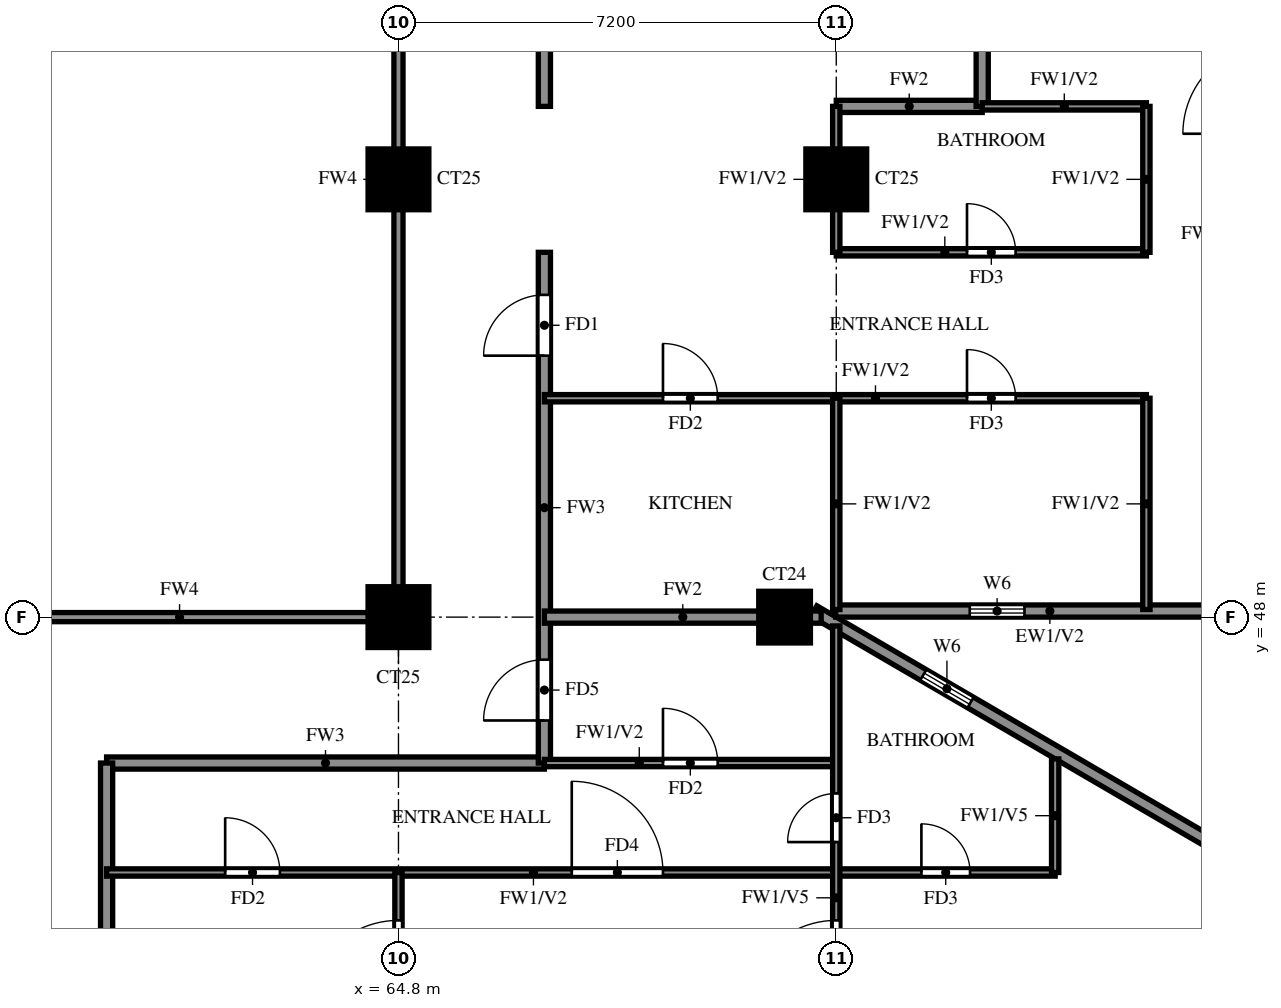
"""IFC4 building model, lengths in metres.
Left out: names, types, materials, properties, quantities, classifications, styles, units other than length and angle.
Written with IfcOpenShell. Run it as: python <this file> out.ifc"""

import sys

from ifc_helpers import new_model, si_unit, direction, frame, frame_2d, origin, origin_2d, place, context, subcontext, project, spatial, rectangle, extrude, source, transform, mapped, element, fill, save


model = new_model("IFC4")
c1 = context("Model", 3, precision=1e-05, world=origin(), true_north=direction((0.0, 1.0)))
c2 = subcontext(c1, "Body", "Model", "MODEL_VIEW")
j1 = project(units=[si_unit("LENGTHUNIT", "METRE"), si_unit("PLANEANGLEUNIT", "RADIAN")], contexts=[c1])
p1 = place(None, origin())
s1 = spatial("IfcSite", under=j1, at=p1, CompositionType="ELEMENT")
p2 = place(p1, origin())
s2 = spatial("IfcBuilding", under=s1, at=p2, CompositionType="ELEMENT")
p3 = place(p2, frame((0.0, 0.0, 146.5)))
s3 = spatial("IfcBuildingStorey", under=s2, at=p3, CompositionType="ELEMENT", Elevation=146.5)
m1 = source(origin(), c2, "Body", "SweptSolid", [
    extrude(rectangle(XDim=1.0, YDim=1.0, at=origin_2d()), origin(), (0.0, 0.0, 1.0), 3.2),
])
p4 = place(p3, frame((64.8, 48.0, 0.0), z_axis=(0.0, 0.0, 1.0), x_axis=(1.0, 0.0, 0.0)))
e1 = element("IfcColumn", 1, at=p4, inside=s3, PredefinedType="COLUMN", context=c2, shape_type="MappedRepresentation", body=[
    mapped(m1, transform((0.0, 0.0, 0.0))),
])
m2 = source(origin(), c2, "Body", "SweptSolid", [
    extrude(rectangle(XDim=0.85, YDim=0.85, at=origin_2d()), origin(), (0.0, 0.0, 1.0), 3.2),
])
p5 = place(p3, frame((71.15, 48.0, 0.0), z_axis=(0.0, 0.0, 1.0), x_axis=(1.0, 0.0, 0.0)))
e2 = element("IfcColumn", 2, at=p5, inside=s3, PredefinedType="COLUMN", context=c2, shape_type="MappedRepresentation", body=[
    mapped(m2, transform((0.0, 0.0, 0.0))),
])
for number, where, z_axis, x_axis in (
    (3, (64.8, 55.2, 0.0), (0.0, 0.0, 1.0), (1.0, 0.0, 0.0)),
    (4, (72.0, 55.2, 0.0), (0.0, 0.0, 1.0), (1.0, 0.0, 0.0)),
):
    element("IfcColumn", number, at=place(p3, frame(where, z_axis=z_axis, x_axis=x_axis)), inside=s3, PredefinedType="COLUMN", context=c2, shape_type="MappedRepresentation", body=[
        mapped(m1, transform((0.0, 0.0, 0.0))),
    ])
p6 = place(p3, frame((85.719, 39.881, 0.0), z_axis=(0.0, 0.0, 1.0), x_axis=(-0.86377618652, 0.503875678716, 0.0)))
e5 = element("IfcWall", 5, at=p6, inside=s3, PredefinedType="SOLIDWALL", context=c2, shape_type="SweptSolid", body=[
    extrude(rectangle(XDim=16.311, YDim=0.2, at=frame_2d((8.156, 0.0))), origin(), (0.0, 0.0, 1.0), 3.2),
])
p7 = place(p6, frame((13.326, 0.0, 1.5)))
e6 = element("IfcOpeningElement", 6, at=p7, cuts=e5, PredefinedType="OPENING", context=c2, shape_type="SweptSolid", body=[
    extrude(rectangle(XDim=0.9, YDim=0.9, at=frame_2d((0.45, 0.45))), frame((0.0, 0.11, 0.0), z_axis=(0.0, -1.0, 0.0), x_axis=(1.0, 0.0, 0.0)), (0.0, 0.0, 1.0), 0.22),
])
p8 = place(p3, frame((71.99, 48.1, 0.0), z_axis=(0.0, 0.0, 1.0), x_axis=(1.0, 0.0, 0.0)))
e7 = element("IfcWall", 7, at=p8, inside=s3, PredefinedType="SOLIDWALL", context=c2, shape_type="SweptSolid", body=[
    extrude(rectangle(XDim=6.71, YDim=0.2, at=frame_2d((3.355, 0.0))), origin(), (0.0, 0.0, 1.0), 3.2),
])
p9 = place(p8, frame((2.205, 0.0, 1.5)))
e8 = element("IfcOpeningElement", 8, at=p9, cuts=e7, PredefinedType="OPENING", context=c2, shape_type="SweptSolid", body=[
    extrude(rectangle(XDim=0.9, YDim=0.9, at=frame_2d((0.45, 0.45))), frame((0.0, 0.11, 0.0), z_axis=(0.0, -1.0, 0.0), x_axis=(1.0, 0.0, 0.0)), (0.0, 0.0, 1.0), 0.22),
])
p10 = place(p3, frame((60.0, 45.6, 0.0), z_axis=(0.0, 0.0, 1.0), x_axis=(1.0, 0.0, 0.0)))
e9 = element("IfcWall", 9, at=p10, inside=s3, PredefinedType="SOLIDWALL", context=c2, shape_type="SweptSolid", body=[
    extrude(rectangle(XDim=7.2, YDim=0.2, at=frame_2d((3.6, 0.0))), origin(), (0.0, 0.0, 1.0), 3.2),
])
p11 = place(p3, frame((60.0, 39.725, 0.0), z_axis=(0.0, 0.0, 1.0), x_axis=(0.0, 1.0, 0.0)))
e10 = element("IfcWall", 10, at=p11, inside=s3, PredefinedType="SOLIDWALL", context=c2, shape_type="SweptSolid", body=[
    extrude(rectangle(XDim=5.875, YDim=0.2, at=frame_2d((2.938, 0.0))), origin(), (0.0, 0.0, 1.0), 3.2),
])
p12 = place(p3, frame((67.2, 45.6, 0.0), z_axis=(0.0, 0.0, 1.0), x_axis=(0.0, 1.0, 0.0)))
e11 = element("IfcWall", 11, at=p12, inside=s3, PredefinedType="SOLIDWALL", context=c2, shape_type="SweptSolid", body=[
    extrude(rectangle(XDim=8.4, YDim=0.2, at=frame_2d((4.2, 0.0))), origin(), (0.0, 0.0, 1.0), 3.2),
])
p13 = place(p12, frame((6.7, 0.0, 0.0)))
e12 = element("IfcOpeningElement", 12, at=p13, cuts=e11, PredefinedType="OPENING", context=c2, shape_type="SweptSolid", body=[
    extrude(rectangle(XDim=1.0, YDim=2.1, at=frame_2d((0.5, 1.05))), frame((0.0, 0.11, 0.0), z_axis=(0.0, -1.0, 0.0), x_axis=(1.0, 0.0, 0.0)), (0.0, 0.0, 1.0), 0.22),
])
p14 = place(p12, frame((0.7, 0.0, 0.0)))
e13 = element("IfcOpeningElement", 13, at=p14, cuts=e11, PredefinedType="OPENING", context=c2, shape_type="SweptSolid", body=[
    extrude(rectangle(XDim=1.0, YDim=2.1, at=frame_2d((0.5, 1.05))), frame((0.0, 0.11, 0.0), z_axis=(0.0, -1.0, 0.0), x_axis=(1.0, 0.0, 0.0)), (0.0, 0.0, 1.0), 0.22),
])
p15 = place(p3, frame((67.2, 56.4, 0.0), z_axis=(0.0, 0.0, 1.0), x_axis=(0.0, 1.0, 0.0)))
e14 = element("IfcWall", 14, at=p15, inside=s3, PredefinedType="SOLIDWALL", context=c2, shape_type="SweptSolid", body=[
    extrude(rectangle(XDim=6.0, YDim=0.2, at=frame_2d((3.0, 0.0))), origin(), (0.0, 0.0, 1.0), 3.2),
])
p16 = place(p15, frame((3.7, 0.0, 0.0)))
e15 = element("IfcOpeningElement", 15, at=p16, cuts=e14, PredefinedType="OPENING", context=c2, shape_type="SweptSolid", body=[
    extrude(rectangle(XDim=1.0, YDim=2.1, at=frame_2d((0.5, 1.05))), frame((0.0, 0.11, 0.0), z_axis=(0.0, -1.0, 0.0), x_axis=(1.0, 0.0, 0.0)), (0.0, 0.0, 1.0), 0.22),
])
p17 = place(p3, frame((67.2, 48.0, 0.0), z_axis=(0.0, 0.0, 1.0), x_axis=(1.0, 0.0, 0.0)))
e16 = element("IfcWall", 16, at=p17, inside=s3, PredefinedType="SOLIDWALL", context=c2, shape_type="SweptSolid", body=[
    extrude(rectangle(XDim=4.552, YDim=0.2, at=frame_2d((2.276, 0.0))), origin(), (0.0, 0.0, 1.0), 3.2),
])
p18 = place(p3, frame((72.0, 56.4, 0.0), z_axis=(0.0, 0.0, 1.0), x_axis=(1.0, 0.0, 0.0)))
e17 = element("IfcWall", 17, at=p18, inside=s3, PredefinedType="SOLIDWALL", context=c2, shape_type="SweptSolid", body=[
    extrude(rectangle(XDim=2.4, YDim=0.2, at=frame_2d((1.2, 0.0))), origin(), (0.0, 0.0, 1.0), 3.2),
])
p19 = place(p3, frame((74.4, 56.4, 0.0), z_axis=(0.0, 0.0, 1.0), x_axis=(0.0, 1.0, 0.0)))
e18 = element("IfcWall", 18, at=p19, inside=s3, PredefinedType="SOLIDWALL", context=c2, shape_type="SweptSolid", body=[
    extrude(rectangle(XDim=2.4, YDim=0.2, at=frame_2d((1.2, 0.0))), origin(), (0.0, 0.0, 1.0), 3.2),
])
p20 = place(p3, frame((60.0, 43.8, 0.0), z_axis=(0.0, 0.0, 1.0), x_axis=(1.0, 0.0, 0.0)))
e19 = element("IfcWall", 19, at=p20, inside=s3, PredefinedType="PARTITIONING", context=c2, shape_type="SweptSolid", body=[
    extrude(rectangle(XDim=15.6, YDim=0.12, at=frame_2d((7.8, 0.0))), origin(), (0.0, 0.0, 1.0), 3.2),
])
p21 = place(p20, frame((7.65, 0.0, 0.0)))
e20 = element("IfcOpeningElement", 20, at=p21, cuts=e19, PredefinedType="OPENING", context=c2, shape_type="SweptSolid", body=[
    extrude(rectangle(XDim=1.5, YDim=2.1, at=frame_2d((0.75, 1.05))), frame((0.0, 0.07, 0.0), z_axis=(0.0, -1.0, 0.0), x_axis=(1.0, 0.0, 0.0)), (0.0, 0.0, 1.0), 0.14),
])
p22 = place(p20, frame((1.95, 0.0, 0.0)))
e21 = element("IfcOpeningElement", 21, at=p22, cuts=e19, PredefinedType="OPENING", context=c2, shape_type="SweptSolid", body=[
    extrude(rectangle(XDim=0.9, YDim=2.1, at=frame_2d((0.45, 1.05))), frame((0.0, 0.07, 0.0), z_axis=(0.0, -1.0, 0.0), x_axis=(1.0, 0.0, 0.0)), (0.0, 0.0, 1.0), 0.14),
])
p23 = place(p20, frame((13.4, 0.0, 0.0)))
e22 = element("IfcOpeningElement", 22, at=p23, cuts=e19, PredefinedType="OPENING", context=c2, shape_type="SweptSolid", body=[
    extrude(rectangle(XDim=0.8, YDim=2.1, at=frame_2d((0.4, 1.05))), frame((0.0, 0.07, 0.0), z_axis=(0.0, -1.0, 0.0), x_axis=(1.0, 0.0, 0.0)), (0.0, 0.0, 1.0), 0.14),
])
p24 = place(p3, frame((67.2, 45.6, 0.0), z_axis=(0.0, 0.0, 1.0), x_axis=(1.0, 0.0, 0.0)))
e23 = element("IfcWall", 23, at=p24, inside=s3, PredefinedType="PARTITIONING", context=c2, shape_type="SweptSolid", body=[
    extrude(rectangle(XDim=4.8, YDim=0.12, at=frame_2d((2.4, 0.0))), origin(), (0.0, 0.0, 1.0), 3.2),
])
p25 = place(p24, frame((1.95, 0.0, 0.0)))
e24 = element("IfcOpeningElement", 24, at=p25, cuts=e23, PredefinedType="OPENING", context=c2, shape_type="SweptSolid", body=[
    extrude(rectangle(XDim=0.9, YDim=2.1, at=frame_2d((0.45, 1.05))), frame((0.0, 0.07, 0.0), z_axis=(0.0, -1.0, 0.0), x_axis=(1.0, 0.0, 0.0)), (0.0, 0.0, 1.0), 0.14),
])
p26 = place(p3, frame((67.2, 51.6, 0.0), z_axis=(0.0, 0.0, 1.0), x_axis=(1.0, 0.0, 0.0)))
e25 = element("IfcWall", 25, at=p26, inside=s3, PredefinedType="PARTITIONING", context=c2, shape_type="SweptSolid", body=[
    extrude(rectangle(XDim=9.9, YDim=0.12, at=frame_2d((4.95, 0.0))), origin(), (0.0, 0.0, 1.0), 3.2),
])
p27 = place(p26, frame((6.95, 0.0, 0.0)))
e26 = element("IfcOpeningElement", 26, at=p27, cuts=e25, PredefinedType="OPENING", context=c2, shape_type="SweptSolid", body=[
    extrude(rectangle(XDim=0.8, YDim=2.1, at=frame_2d((0.4, 1.05))), frame((0.0, 0.07, 0.0), z_axis=(0.0, -1.0, 0.0), x_axis=(1.0, 0.0, 0.0)), (0.0, 0.0, 1.0), 0.14),
])
p28 = place(p26, frame((1.95, 0.0, 0.0)))
e27 = element("IfcOpeningElement", 27, at=p28, cuts=e25, PredefinedType="OPENING", context=c2, shape_type="SweptSolid", body=[
    extrude(rectangle(XDim=0.9, YDim=2.1, at=frame_2d((0.45, 1.05))), frame((0.0, 0.07, 0.0), z_axis=(0.0, -1.0, 0.0), x_axis=(1.0, 0.0, 0.0)), (0.0, 0.0, 1.0), 0.14),
])
p29 = place(p3, frame((72.0, 54.0, 0.0), z_axis=(0.0, 0.0, 1.0), x_axis=(1.0, 0.0, 0.0)))
e28 = element("IfcWall", 28, at=p29, inside=s3, PredefinedType="PARTITIONING", context=c2, shape_type="SweptSolid", body=[
    extrude(rectangle(XDim=5.1, YDim=0.12, at=frame_2d((2.55, 0.0))), origin(), (0.0, 0.0, 1.0), 3.2),
])
p30 = place(p29, frame((2.15, 0.0, 0.0)))
e29 = element("IfcOpeningElement", 29, at=p30, cuts=e28, PredefinedType="OPENING", context=c2, shape_type="SweptSolid", body=[
    extrude(rectangle(XDim=0.8, YDim=2.1, at=frame_2d((0.4, 1.05))), frame((0.0, 0.07, 0.0), z_axis=(0.0, -1.0, 0.0), x_axis=(1.0, 0.0, 0.0)), (0.0, 0.0, 1.0), 0.14),
])
p31 = place(p3, frame((74.4, 56.4, 0.0), z_axis=(0.0, 0.0, 1.0), x_axis=(1.0, 0.0, 0.0)))
e30 = element("IfcWall", 30, at=p31, inside=s3, PredefinedType="PARTITIONING", context=c2, shape_type="SweptSolid", body=[
    extrude(rectangle(XDim=2.7, YDim=0.12, at=frame_2d((1.35, 0.0))), origin(), (0.0, 0.0, 1.0), 3.2),
])
p32 = place(p3, frame((64.8, 39.725, 0.0), z_axis=(0.0, 0.0, 1.0), x_axis=(0.0, 1.0, 0.0)))
e31 = element("IfcWall", 31, at=p32, inside=s3, PredefinedType="PARTITIONING", context=c2, shape_type="SweptSolid", body=[
    extrude(rectangle(XDim=4.075, YDim=0.12, at=frame_2d((2.038, 0.0))), origin(), (0.0, 0.0, 1.0), 3.2),
])
p33 = place(p32, frame((1.788, 0.0, 0.0)))
e32 = element("IfcOpeningElement", 32, at=p33, cuts=e31, PredefinedType="OPENING", context=c2, shape_type="SweptSolid", body=[
    extrude(rectangle(XDim=1.5, YDim=2.1, at=frame_2d((0.75, 1.05))), frame((0.0, 0.07, 0.0), z_axis=(0.0, -1.0, 0.0), x_axis=(1.0, 0.0, 0.0)), (0.0, 0.0, 1.0), 0.14),
])
p34 = place(p3, frame((72.0, 39.725, 0.0), z_axis=(0.0, 0.0, 1.0), x_axis=(0.0, 1.0, 0.0)))
e33 = element("IfcWall", 33, at=p34, inside=s3, PredefinedType="PARTITIONING", context=c2, shape_type="SweptSolid", body=[
    extrude(rectangle(XDim=8.13, YDim=0.12, at=frame_2d((4.065, 0.0))), origin(), (0.0, 0.0, 1.0), 2.3),
])
p35 = place(p34, frame((1.788, 0.0, 0.0)))
e34 = element("IfcOpeningElement", 34, at=p35, cuts=e33, PredefinedType="OPENING", context=c2, shape_type="SweptSolid", body=[
    extrude(rectangle(XDim=1.5, YDim=2.1, at=frame_2d((0.75, 1.05))), frame((0.0, 0.07, 0.0), z_axis=(0.0, -1.0, 0.0), x_axis=(1.0, 0.0, 0.0)), (0.0, 0.0, 1.0), 0.14),
])
p36 = place(p34, frame((4.575, 0.0, 0.0)))
e35 = element("IfcOpeningElement", 35, at=p36, cuts=e33, PredefinedType="OPENING", context=c2, shape_type="SweptSolid", body=[
    extrude(rectangle(XDim=0.8, YDim=2.1, at=frame_2d((0.4, 1.05))), frame((0.0, 0.07, 0.0), z_axis=(0.0, -1.0, 0.0), x_axis=(1.0, 0.0, 0.0)), (0.0, 0.0, 1.0), 0.14),
])
p37 = place(p3, frame((72.0, 48.125, 0.0), z_axis=(0.0, 0.0, 1.0), x_axis=(0.0, 1.0, 0.0)))
e36 = element("IfcWall", 36, at=p37, inside=s3, PredefinedType="PARTITIONING", context=c2, shape_type="SweptSolid", body=[
    extrude(rectangle(XDim=3.475, YDim=0.12, at=frame_2d((1.738, 0.0))), origin(), (0.0, 0.0, 1.0), 3.2),
])
p38 = place(p3, frame((72.0, 54.0, 0.0), z_axis=(0.0, 0.0, 1.0), x_axis=(0.0, 1.0, 0.0)))
e37 = element("IfcWall", 37, at=p38, inside=s3, PredefinedType="PARTITIONING", context=c2, shape_type="SweptSolid", body=[
    extrude(rectangle(XDim=2.4, YDim=0.12, at=frame_2d((1.2, 0.0))), origin(), (0.0, 0.0, 1.0), 3.2),
])
p39 = place(p3, frame((75.6, 43.8, 0.0), z_axis=(0.0, 0.0, 1.0), x_axis=(0.0, 1.0, 0.0)))
e38 = element("IfcWall", 38, at=p39, inside=s3, PredefinedType="PARTITIONING", context=c2, shape_type="SweptSolid", body=[
    extrude(rectangle(XDim=1.868, YDim=0.12, at=frame_2d((0.934, 0.0))), origin(), (0.0, 0.0, 1.0), 2.3),
])
p40 = place(p3, frame((77.1, 48.125, 0.0), z_axis=(0.0, 0.0, 1.0), x_axis=(0.0, 1.0, 0.0)))
e39 = element("IfcWall", 39, at=p40, inside=s3, PredefinedType="PARTITIONING", context=c2, shape_type="SweptSolid", body=[
    extrude(rectangle(XDim=3.475, YDim=0.12, at=frame_2d((1.738, 0.0))), origin(), (0.0, 0.0, 1.0), 3.2),
])
p41 = place(p3, frame((77.1, 54.0, 0.0), z_axis=(0.0, 0.0, 1.0), x_axis=(0.0, 1.0, 0.0)))
e40 = element("IfcWall", 40, at=p41, inside=s3, PredefinedType="PARTITIONING", context=c2, shape_type="SweptSolid", body=[
    extrude(rectangle(XDim=2.4, YDim=0.12, at=frame_2d((1.2, 0.0))), origin(), (0.0, 0.0, 1.0), 3.2),
])
p42 = place(p3, frame((57.6, 48.0, 0.0), z_axis=(0.0, 0.0, 1.0), x_axis=(1.0, 0.0, 0.0)))
e41 = element("IfcWall", 41, at=p42, inside=s3, PredefinedType="SOLIDWALL", context=c2, shape_type="SweptSolid", body=[
    extrude(rectangle(XDim=7.2, YDim=0.15, at=frame_2d((3.6, 0.0))), origin(), (0.0, 0.0, 1.0), 2.3),
])
p43 = place(p3, frame((64.8, 48.0, 0.0), z_axis=(0.0, 0.0, 1.0), x_axis=(0.0, 1.0, 0.0)))
e42 = element("IfcWall", 42, at=p43, inside=s3, PredefinedType="SOLIDWALL", context=c2, shape_type="SweptSolid", body=[
    extrude(rectangle(XDim=14.4, YDim=0.15, at=frame_2d((7.2, 0.0))), origin(), (0.0, 0.0, 1.0), 2.3),
])
p44 = place(p7, origin())
e43 = element("IfcWindow", 43, at=p44, inside=s3, PartitioningType="SINGLE_PANEL", PredefinedType="WINDOW", context=c2, shape_type="SweptSolid", body=[
    extrude(rectangle(XDim=0.9, YDim=0.9, at=frame_2d((0.45, 0.45))), frame((0.0, 0.03, 0.0), z_axis=(0.0, -1.0, 0.0), x_axis=(1.0, 0.0, 0.0)), (0.0, 0.0, 1.0), 0.06),
])
fill(e6, e43)
p45 = place(p9, origin())
e44 = element("IfcWindow", 44, at=p45, inside=s3, PartitioningType="SINGLE_PANEL", PredefinedType="WINDOW", context=c2, shape_type="SweptSolid", body=[
    extrude(rectangle(XDim=0.9, YDim=0.9, at=frame_2d((0.45, 0.45))), frame((0.0, 0.03, 0.0), z_axis=(0.0, -1.0, 0.0), x_axis=(1.0, 0.0, 0.0)), (0.0, 0.0, 1.0), 0.06),
])
fill(e8, e44)
p46 = place(p13, origin())
e45 = element("IfcDoor", 45, at=p46, inside=s3, OperationType="SINGLE_SWING_LEFT", PredefinedType="DOOR", context=c2, shape_type="SweptSolid", body=[
    extrude(rectangle(XDim=1.0, YDim=2.1, at=frame_2d((0.5, 1.05))), frame((0.0, 0.025, 0.0), z_axis=(0.0, -1.0, 0.0), x_axis=(1.0, 0.0, 0.0)), (0.0, 0.0, 1.0), 0.05),
])
fill(e12, e45)
p47 = place(p27, origin())
e46 = element("IfcDoor", 46, at=p47, inside=s3, OperationType="SINGLE_SWING_LEFT", PredefinedType="DOOR", context=c2, shape_type="SweptSolid", body=[
    extrude(rectangle(XDim=0.8, YDim=2.1, at=frame_2d((0.4, 1.05))), frame((0.0, 0.025, 0.0), z_axis=(0.0, -1.0, 0.0), x_axis=(1.0, 0.0, 0.0)), (0.0, 0.0, 1.0), 0.05),
])
fill(e26, e46)
p48 = place(p30, origin())
e47 = element("IfcDoor", 47, at=p48, inside=s3, OperationType="SINGLE_SWING_RIGHT", PredefinedType="DOOR", context=c2, shape_type="SweptSolid", body=[
    extrude(rectangle(XDim=0.8, YDim=2.1, at=frame_2d((0.4, 1.05))), frame((0.0, 0.025, 0.0), z_axis=(0.0, -1.0, 0.0), x_axis=(1.0, 0.0, 0.0)), (0.0, 0.0, 1.0), 0.05),
])
fill(e29, e47)
p49 = place(p28, origin())
e48 = element("IfcDoor", 48, at=p49, inside=s3, OperationType="SINGLE_SWING_LEFT", PredefinedType="DOOR", context=c2, shape_type="SweptSolid", body=[
    extrude(rectangle(XDim=0.9, YDim=2.1, at=frame_2d((0.45, 1.05))), frame((0.0, 0.025, 0.0), z_axis=(0.0, -1.0, 0.0), x_axis=(1.0, 0.0, 0.0)), (0.0, 0.0, 1.0), 0.05),
])
fill(e27, e48)
p50 = place(p33, origin())
e49 = element("IfcDoor", 49, at=p50, inside=s3, OperationType="SINGLE_SWING_LEFT", PredefinedType="DOOR", context=c2, shape_type="SweptSolid", body=[
    extrude(rectangle(XDim=1.5, YDim=2.1, at=frame_2d((0.75, 1.05))), frame((0.0, 0.025, 0.0), z_axis=(0.0, -1.0, 0.0), x_axis=(1.0, 0.0, 0.0)), (0.0, 0.0, 1.0), 0.05),
])
fill(e32, e49)
p51 = place(p25, origin())
e50 = element("IfcDoor", 50, at=p51, inside=s3, OperationType="SINGLE_SWING_LEFT", PredefinedType="DOOR", context=c2, shape_type="SweptSolid", body=[
    extrude(rectangle(XDim=0.9, YDim=2.1, at=frame_2d((0.45, 1.05))), frame((0.0, 0.025, 0.0), z_axis=(0.0, -1.0, 0.0), x_axis=(1.0, 0.0, 0.0)), (0.0, 0.0, 1.0), 0.05),
])
fill(e24, e50)
p52 = place(p14, origin())
e51 = element("IfcDoor", 51, at=p52, inside=s3, OperationType="SINGLE_SWING_LEFT", PredefinedType="DOOR", context=c2, shape_type="SweptSolid", body=[
    extrude(rectangle(XDim=1.0, YDim=2.1, at=frame_2d((0.5, 1.05))), frame((0.0, 0.025, 0.0), z_axis=(0.0, -1.0, 0.0), x_axis=(1.0, 0.0, 0.0)), (0.0, 0.0, 1.0), 0.05),
])
fill(e13, e51)
p53 = place(p21, origin())
e52 = element("IfcDoor", 52, at=p53, inside=s3, OperationType="SINGLE_SWING_RIGHT", PredefinedType="DOOR", context=c2, shape_type="SweptSolid", body=[
    extrude(rectangle(XDim=1.5, YDim=2.1, at=frame_2d((0.75, 1.05))), frame((0.0, 0.025, 0.0), z_axis=(0.0, -1.0, 0.0), x_axis=(1.0, 0.0, 0.0)), (0.0, 0.0, 1.0), 0.05),
])
fill(e20, e52)
p54 = place(p22, origin())
e53 = element("IfcDoor", 53, at=p54, inside=s3, OperationType="SINGLE_SWING_LEFT", PredefinedType="DOOR", context=c2, shape_type="SweptSolid", body=[
    extrude(rectangle(XDim=0.9, YDim=2.1, at=frame_2d((0.45, 1.05))), frame((0.0, 0.025, 0.0), z_axis=(0.0, -1.0, 0.0), x_axis=(1.0, 0.0, 0.0)), (0.0, 0.0, 1.0), 0.05),
])
fill(e21, e53)
p55 = place(p35, origin())
e54 = element("IfcDoor", 54, at=p55, inside=s3, OperationType="SINGLE_SWING_RIGHT", PredefinedType="DOOR", context=c2, shape_type="SweptSolid", body=[
    extrude(rectangle(XDim=1.5, YDim=2.1, at=frame_2d((0.75, 1.05))), frame((0.0, 0.025, 0.0), z_axis=(0.0, -1.0, 0.0), x_axis=(1.0, 0.0, 0.0)), (0.0, 0.0, 1.0), 0.05),
])
fill(e34, e54)
p56 = place(p36, origin())
e55 = element("IfcDoor", 55, at=p56, inside=s3, OperationType="SINGLE_SWING_RIGHT", PredefinedType="DOOR", context=c2, shape_type="SweptSolid", body=[
    extrude(rectangle(XDim=0.8, YDim=2.1, at=frame_2d((0.4, 1.05))), frame((0.0, 0.025, 0.0), z_axis=(0.0, -1.0, 0.0), x_axis=(1.0, 0.0, 0.0)), (0.0, 0.0, 1.0), 0.05),
])
fill(e35, e55)
p57 = place(p23, origin())
e56 = element("IfcDoor", 56, at=p57, inside=s3, OperationType="SINGLE_SWING_LEFT", PredefinedType="DOOR", context=c2, shape_type="SweptSolid", body=[
    extrude(rectangle(XDim=0.8, YDim=2.1, at=frame_2d((0.4, 1.05))), frame((0.0, 0.025, 0.0), z_axis=(0.0, -1.0, 0.0), x_axis=(1.0, 0.0, 0.0)), (0.0, 0.0, 1.0), 0.05),
])
fill(e22, e56)
save(model, sys.argv[1])
